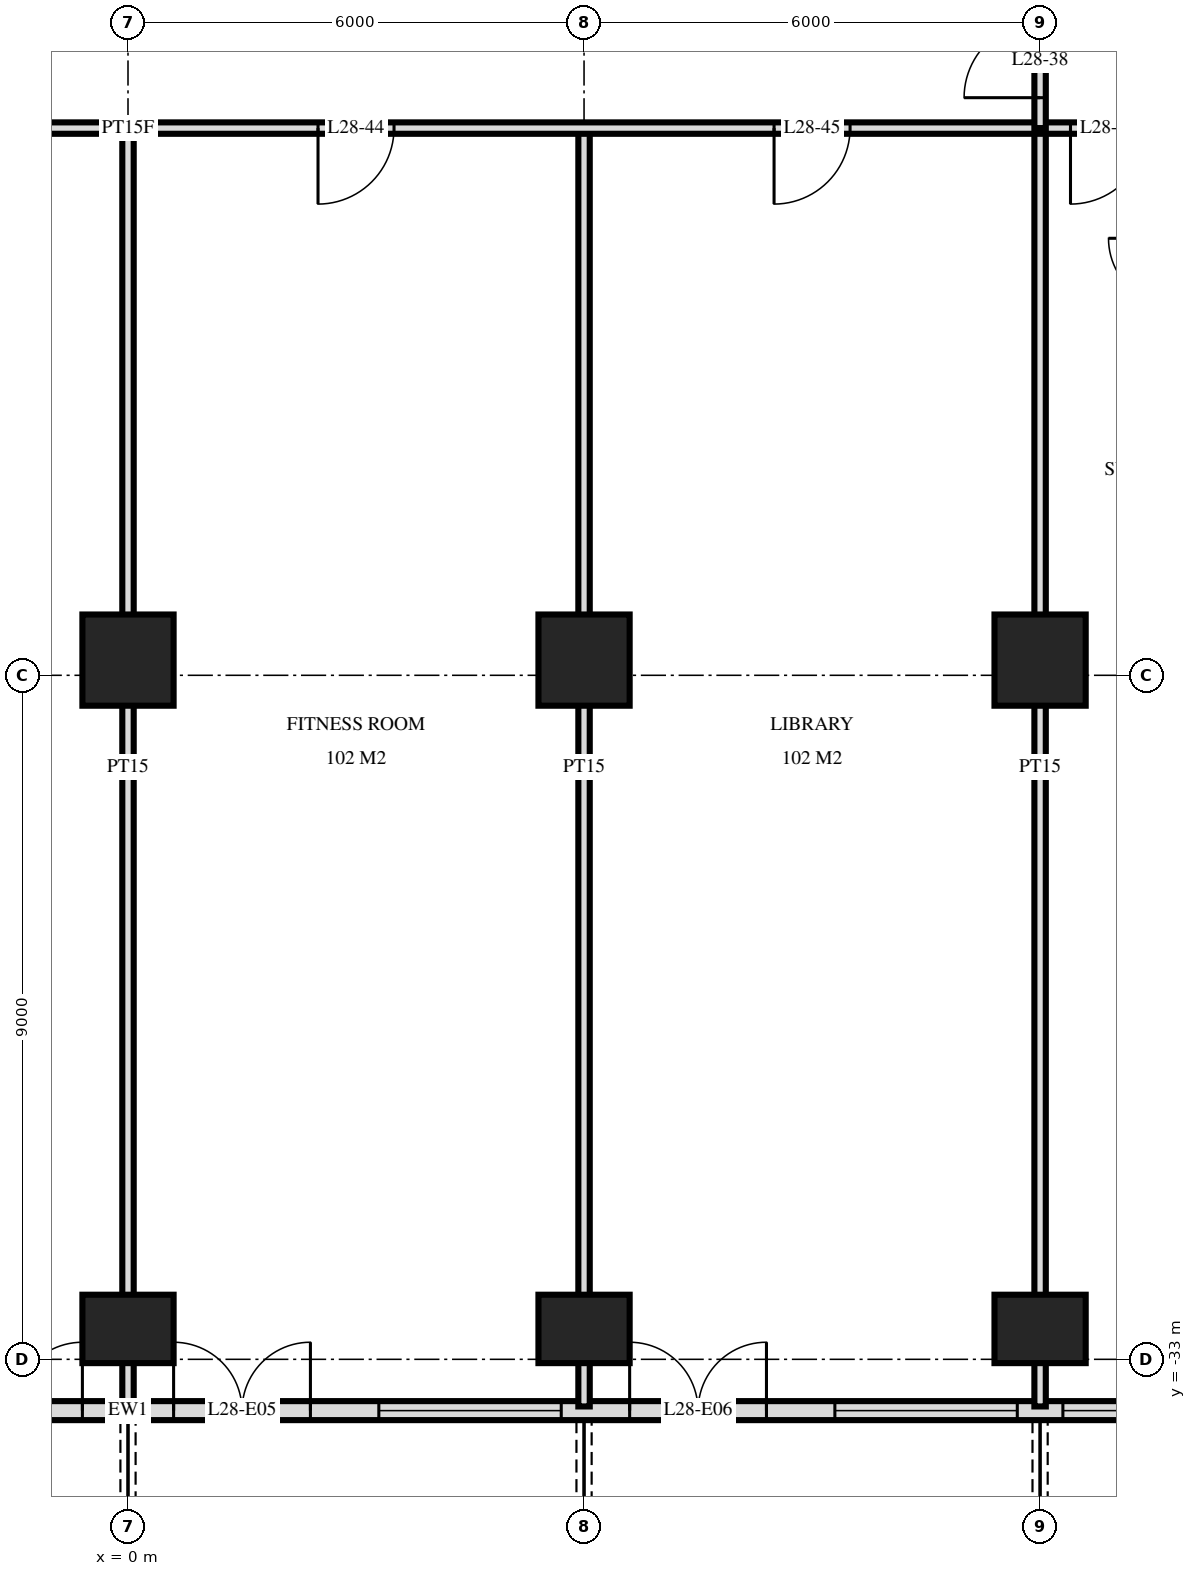
"""IFC4 building model, lengths in metres.
Left out: names, types, materials, properties, quantities, classifications, styles, units other than length and angle.
Written with IfcOpenShell. Run it as: python <this file> out.ifc"""

import sys

from ifc_helpers import new_model, si_unit, direction, frame, frame_2d, origin, origin_2d, place, context, subcontext, project, spatial, rectangle, extrude, element, fill, save


model = new_model("IFC4")
c1 = context("Model", 3, precision=1e-05, world=origin(), true_north=direction((0.0, 1.0)))
c2 = subcontext(c1, "Body", "Model", "MODEL_VIEW")
j1 = project(units=[si_unit("LENGTHUNIT", "METRE"), si_unit("PLANEANGLEUNIT", "RADIAN")], contexts=[c1])
p1 = place(None, origin())
s1 = spatial("IfcSite", under=j1, at=p1, CompositionType="ELEMENT")
p2 = place(p1, origin())
s2 = spatial("IfcBuilding", under=s1, at=p2, CompositionType="ELEMENT")
p3 = place(p2, frame((0.0, 0.0, 112.8)))
s3 = spatial("IfcBuildingStorey", under=s2, at=p3, CompositionType="ELEMENT", Elevation=112.8)
p4 = place(p3, frame((0.0, -32.6, -0.28), z_axis=(0.0, 0.0, 1.0), x_axis=(1.0, 0.0, 0.0)))
e1 = element("IfcColumn", 1, at=p4, inside=s3, PredefinedType="COLUMN", context=c2, shape_type="SweptSolid", body=[
    extrude(rectangle(XDim=1.2, YDim=0.9, at=origin_2d()), origin(), (0.0, 0.0, 1.0), 3.88),
])
p5 = place(p3, frame((0.0, -23.8, -0.28), z_axis=(0.0, 0.0, 1.0), x_axis=(1.0, 0.0, 0.0)))
e2 = element("IfcColumn", 2, at=p5, inside=s3, PredefinedType="COLUMN", context=c2, shape_type="SweptSolid", body=[
    extrude(rectangle(XDim=1.2, YDim=1.2, at=origin_2d()), origin(), (0.0, 0.0, 1.0), 3.88),
])
p6 = place(p3, frame((6.0, -32.6, -0.28), z_axis=(0.0, 0.0, 1.0), x_axis=(1.0, 0.0, 0.0)))
e3 = element("IfcColumn", 3, at=p6, inside=s3, PredefinedType="COLUMN", context=c2, shape_type="SweptSolid", body=[
    extrude(rectangle(XDim=1.2, YDim=0.9, at=origin_2d()), origin(), (0.0, 0.0, 1.0), 3.88),
])
p7 = place(p3, frame((6.0, -23.8, -0.28), z_axis=(0.0, 0.0, 1.0), x_axis=(1.0, 0.0, 0.0)))
e4 = element("IfcColumn", 4, at=p7, inside=s3, PredefinedType="COLUMN", context=c2, shape_type="SweptSolid", body=[
    extrude(rectangle(XDim=1.2, YDim=1.2, at=origin_2d()), origin(), (0.0, 0.0, 1.0), 3.88),
])
p8 = place(p3, frame((12.0, -32.6, -0.28), z_axis=(0.0, 0.0, 1.0), x_axis=(1.0, 0.0, 0.0)))
e5 = element("IfcColumn", 5, at=p8, inside=s3, PredefinedType="COLUMN", context=c2, shape_type="SweptSolid", body=[
    extrude(rectangle(XDim=1.2, YDim=0.9, at=origin_2d()), origin(), (0.0, 0.0, 1.0), 3.88),
])
p9 = place(p3, frame((12.0, -23.8, -0.28), z_axis=(0.0, 0.0, 1.0), x_axis=(1.0, 0.0, 0.0)))
e6 = element("IfcColumn", 6, at=p9, inside=s3, PredefinedType="COLUMN", context=c2, shape_type="SweptSolid", body=[
    extrude(rectangle(XDim=1.2, YDim=1.2, at=origin_2d()), origin(), (0.0, 0.0, 1.0), 3.88),
])
p10 = place(p3, frame((-23.675, -33.675, 0.0), z_axis=(0.0, 0.0, 1.0), x_axis=(1.0, 0.0, 0.0)))
e7 = element("IfcWall", 7, at=p10, inside=s3, PredefinedType="SOLIDWALL", context=c2, shape_type="SweptSolid", body=[
    extrude(rectangle(XDim=47.351, YDim=0.25, at=frame_2d((23.675, 0.0))), origin(), (0.0, 0.0, 1.0), 3.32),
])
p11 = place(p10, frame((0.275, 0.0, 0.3)))
e8 = element("IfcOpeningElement", 8, at=p11, cuts=e7, PredefinedType="OPENING", context=c2, shape_type="SweptSolid", body=[
    extrude(rectangle(XDim=2.4, YDim=2.1, at=frame_2d((1.2, 1.05))), frame((0.0, 0.135, 0.0), z_axis=(0.0, -1.0, 0.0), x_axis=(1.0, 0.0, 0.0)), (0.0, 0.0, 1.0), 0.27),
])
p12 = place(p10, frame((3.425, 0.0, 0.0)))
e9 = element("IfcOpeningElement", 9, at=p12, cuts=e7, PredefinedType="OPENING", context=c2, shape_type="SweptSolid", body=[
    extrude(rectangle(XDim=1.8, YDim=2.4, at=frame_2d((0.9, 1.2))), frame((0.0, 0.135, 0.0), z_axis=(0.0, -1.0, 0.0), x_axis=(1.0, 0.0, 0.0)), (0.0, 0.0, 1.0), 0.27),
])
p13 = place(p10, frame((5.975, 0.0, 0.3)))
e10 = element("IfcOpeningElement", 10, at=p13, cuts=e7, PredefinedType="OPENING", context=c2, shape_type="SweptSolid", body=[
    extrude(rectangle(XDim=2.4, YDim=2.1, at=frame_2d((1.2, 1.05))), frame((0.0, 0.135, 0.0), z_axis=(0.0, -1.0, 0.0), x_axis=(1.0, 0.0, 0.0)), (0.0, 0.0, 1.0), 0.27),
])
p14 = place(p10, frame((9.275, 0.0, 0.0)))
e11 = element("IfcOpeningElement", 11, at=p14, cuts=e7, PredefinedType="OPENING", context=c2, shape_type="SweptSolid", body=[
    extrude(rectangle(XDim=1.8, YDim=2.4, at=frame_2d((0.9, 1.2))), frame((0.0, 0.135, 0.0), z_axis=(0.0, -1.0, 0.0), x_axis=(1.0, 0.0, 0.0)), (0.0, 0.0, 1.0), 0.27),
])
p15 = place(p10, frame((12.275, 0.0, 0.0)))
e12 = element("IfcOpeningElement", 12, at=p15, cuts=e7, PredefinedType="OPENING", context=c2, shape_type="SweptSolid", body=[
    extrude(rectangle(XDim=1.8, YDim=2.4, at=frame_2d((0.9, 1.2))), frame((0.0, 0.135, 0.0), z_axis=(0.0, -1.0, 0.0), x_axis=(1.0, 0.0, 0.0)), (0.0, 0.0, 1.0), 0.27),
])
p16 = place(p10, frame((14.975, 0.0, 0.3)))
e13 = element("IfcOpeningElement", 13, at=p16, cuts=e7, PredefinedType="OPENING", context=c2, shape_type="SweptSolid", body=[
    extrude(rectangle(XDim=2.4, YDim=2.1, at=frame_2d((1.2, 1.05))), frame((0.0, 0.135, 0.0), z_axis=(0.0, -1.0, 0.0), x_axis=(1.0, 0.0, 0.0)), (0.0, 0.0, 1.0), 0.27),
])
p17 = place(p10, frame((17.975, 0.0, 0.3)))
e14 = element("IfcOpeningElement", 14, at=p17, cuts=e7, PredefinedType="OPENING", context=c2, shape_type="SweptSolid", body=[
    extrude(rectangle(XDim=2.4, YDim=2.1, at=frame_2d((1.2, 1.05))), frame((0.0, 0.135, 0.0), z_axis=(0.0, -1.0, 0.0), x_axis=(1.0, 0.0, 0.0)), (0.0, 0.0, 1.0), 0.27),
])
p18 = place(p10, frame((21.275, 0.0, 0.0)))
e15 = element("IfcOpeningElement", 15, at=p18, cuts=e7, PredefinedType="OPENING", context=c2, shape_type="SweptSolid", body=[
    extrude(rectangle(XDim=1.8, YDim=2.4, at=frame_2d((0.9, 1.2))), frame((0.0, 0.135, 0.0), z_axis=(0.0, -1.0, 0.0), x_axis=(1.0, 0.0, 0.0)), (0.0, 0.0, 1.0), 0.27),
])
p19 = place(p10, frame((24.275, 0.0, 0.0)))
e16 = element("IfcOpeningElement", 16, at=p19, cuts=e7, PredefinedType="OPENING", context=c2, shape_type="SweptSolid", body=[
    extrude(rectangle(XDim=1.8, YDim=2.4, at=frame_2d((0.9, 1.2))), frame((0.0, 0.135, 0.0), z_axis=(0.0, -1.0, 0.0), x_axis=(1.0, 0.0, 0.0)), (0.0, 0.0, 1.0), 0.27),
])
p20 = place(p10, frame((26.975, 0.0, 0.3)))
e17 = element("IfcOpeningElement", 17, at=p20, cuts=e7, PredefinedType="OPENING", context=c2, shape_type="SweptSolid", body=[
    extrude(rectangle(XDim=2.4, YDim=2.1, at=frame_2d((1.2, 1.05))), frame((0.0, 0.135, 0.0), z_axis=(0.0, -1.0, 0.0), x_axis=(1.0, 0.0, 0.0)), (0.0, 0.0, 1.0), 0.27),
])
p21 = place(p10, frame((30.275, 0.0, 0.0)))
e18 = element("IfcOpeningElement", 18, at=p21, cuts=e7, PredefinedType="OPENING", context=c2, shape_type="SweptSolid", body=[
    extrude(rectangle(XDim=1.8, YDim=2.4, at=frame_2d((0.9, 1.2))), frame((0.0, 0.135, 0.0), z_axis=(0.0, -1.0, 0.0), x_axis=(1.0, 0.0, 0.0)), (0.0, 0.0, 1.0), 0.27),
])
p22 = place(p10, frame((32.975, 0.0, 0.3)))
e19 = element("IfcOpeningElement", 19, at=p22, cuts=e7, PredefinedType="OPENING", context=c2, shape_type="SweptSolid", body=[
    extrude(rectangle(XDim=2.4, YDim=2.1, at=frame_2d((1.2, 1.05))), frame((0.0, 0.135, 0.0), z_axis=(0.0, -1.0, 0.0), x_axis=(1.0, 0.0, 0.0)), (0.0, 0.0, 1.0), 0.27),
])
p23 = place(p10, frame((35.975, 0.0, 0.3)))
e20 = element("IfcOpeningElement", 20, at=p23, cuts=e7, PredefinedType="OPENING", context=c2, shape_type="SweptSolid", body=[
    extrude(rectangle(XDim=2.4, YDim=2.1, at=frame_2d((1.2, 1.05))), frame((0.0, 0.135, 0.0), z_axis=(0.0, -1.0, 0.0), x_axis=(1.0, 0.0, 0.0)), (0.0, 0.0, 1.0), 0.27),
])
p24 = place(p10, frame((39.275, 0.0, 0.0)))
e21 = element("IfcOpeningElement", 21, at=p24, cuts=e7, PredefinedType="OPENING", context=c2, shape_type="SweptSolid", body=[
    extrude(rectangle(XDim=1.8, YDim=2.4, at=frame_2d((0.9, 1.2))), frame((0.0, 0.135, 0.0), z_axis=(0.0, -1.0, 0.0), x_axis=(1.0, 0.0, 0.0)), (0.0, 0.0, 1.0), 0.27),
])
p25 = place(p10, frame((41.975, 0.0, 0.3)))
e22 = element("IfcOpeningElement", 22, at=p25, cuts=e7, PredefinedType="OPENING", context=c2, shape_type="SweptSolid", body=[
    extrude(rectangle(XDim=2.4, YDim=2.1, at=frame_2d((1.2, 1.05))), frame((0.0, 0.135, 0.0), z_axis=(0.0, -1.0, 0.0), x_axis=(1.0, 0.0, 0.0)), (0.0, 0.0, 1.0), 0.27),
])
p26 = place(p10, frame((45.125, 0.0, 0.0)))
e23 = element("IfcOpeningElement", 23, at=p26, cuts=e7, PredefinedType="OPENING", context=c2, shape_type="SweptSolid", body=[
    extrude(rectangle(XDim=1.8, YDim=2.4, at=frame_2d((0.9, 1.2))), frame((0.0, 0.135, 0.0), z_axis=(0.0, -1.0, 0.0), x_axis=(1.0, 0.0, 0.0)), (0.0, 0.0, 1.0), 0.27),
])
p27 = place(p3, frame((12.0, -16.8, 0.0), z_axis=(0.0, 0.0, 1.0), x_axis=(0.0, 1.0, 0.0)))
e24 = element("IfcWall", 24, at=p27, inside=s3, PredefinedType="PARTITIONING", context=c2, shape_type="SweptSolid", body=[
    extrude(rectangle(XDim=1.75, YDim=0.15, at=frame_2d((0.875, 0.0))), origin(), (0.0, 0.0, 1.0), 3.32),
])
p28 = place(p27, frame((0.4, 0.0, 0.0)))
e25 = element("IfcOpeningElement", 25, at=p28, cuts=e24, PredefinedType="OPENING", context=c2, shape_type="SweptSolid", body=[
    extrude(rectangle(XDim=1.0, YDim=2.1, at=frame_2d((0.5, 1.05))), frame((0.0, 0.085, 0.0), z_axis=(0.0, -1.0, 0.0), x_axis=(1.0, 0.0, 0.0)), (0.0, 0.0, 1.0), 0.17),
])
for number, where, z_axis, x_axis in (
    (26, (12.0, -33.62, 0.0), (0.0, 0.0, 1.0), (0.0, 1.0, 0.0)),
    (27, (6.0, -33.62, 0.0), (0.0, 0.0, 1.0), (0.0, 1.0, 0.0)),
    (28, (0.0, -33.62, 0.0), (0.0, 0.0, 1.0), (0.0, 1.0, 0.0)),
):
    element("IfcWall", number, at=place(p3, frame(where, z_axis=z_axis, x_axis=x_axis)), inside=s3, PredefinedType="PARTITIONING", context=c2, shape_type="SweptSolid", body=[
        extrude(rectangle(XDim=16.82, YDim=0.15, at=frame_2d((8.41, 0.0))), origin(), (0.0, 0.0, 1.0), 3.32),
    ])
p29 = place(p3, frame((-28.02, -16.8, 0.0), z_axis=(0.0, 0.0, 1.0), x_axis=(1.0, 0.0, 0.0)))
e29 = element("IfcWall", 29, at=p29, inside=s3, PredefinedType="PARTITIONING", context=c2, shape_type="SweptSolid", body=[
    extrude(rectangle(XDim=56.04, YDim=0.15, at=frame_2d((28.02, 0.0))), origin(), (0.0, 0.0, 1.0), 3.32),
])
p30 = place(p29, frame((13.17, 0.0, 0.0)))
e30 = element("IfcOpeningElement", 30, at=p30, cuts=e29, PredefinedType="OPENING", context=c2, shape_type="SweptSolid", body=[
    extrude(rectangle(XDim=1.0, YDim=2.1, at=frame_2d((0.5, 1.05))), frame((0.0, 0.085, 0.0), z_axis=(0.0, -1.0, 0.0), x_axis=(1.0, 0.0, 0.0)), (0.0, 0.0, 1.0), 0.17),
])
p31 = place(p29, frame((11.87, 0.0, 0.0)))
e31 = element("IfcOpeningElement", 31, at=p31, cuts=e29, PredefinedType="OPENING", context=c2, shape_type="SweptSolid", body=[
    extrude(rectangle(XDim=1.0, YDim=2.1, at=frame_2d((0.5, 1.05))), frame((0.0, 0.085, 0.0), z_axis=(0.0, -1.0, 0.0), x_axis=(1.0, 0.0, 0.0)), (0.0, 0.0, 1.0), 0.17),
])
p32 = place(p29, frame((8.32, 0.0, 0.0)))
e32 = element("IfcOpeningElement", 32, at=p32, cuts=e29, PredefinedType="OPENING", context=c2, shape_type="SweptSolid", body=[
    extrude(rectangle(XDim=1.0, YDim=2.1, at=frame_2d((0.5, 1.05))), frame((0.0, 0.085, 0.0), z_axis=(0.0, -1.0, 0.0), x_axis=(1.0, 0.0, 0.0)), (0.0, 0.0, 1.0), 0.17),
])
p33 = place(p29, frame((40.42, 0.0, 0.0)))
e33 = element("IfcOpeningElement", 33, at=p33, cuts=e29, PredefinedType="OPENING", context=c2, shape_type="SweptSolid", body=[
    extrude(rectangle(XDim=1.0, YDim=2.1, at=frame_2d((0.5, 1.05))), frame((0.0, 0.085, 0.0), z_axis=(0.0, -1.0, 0.0), x_axis=(1.0, 0.0, 0.0)), (0.0, 0.0, 1.0), 0.17),
])
p34 = place(p29, frame((46.72, 0.0, 0.0)))
e34 = element("IfcOpeningElement", 34, at=p34, cuts=e29, PredefinedType="OPENING", context=c2, shape_type="SweptSolid", body=[
    extrude(rectangle(XDim=1.0, YDim=2.1, at=frame_2d((0.5, 1.05))), frame((0.0, 0.085, 0.0), z_axis=(0.0, -1.0, 0.0), x_axis=(1.0, 0.0, 0.0)), (0.0, 0.0, 1.0), 0.17),
])
p35 = place(p29, frame((21.52, 0.0, 0.0)))
e35 = element("IfcOpeningElement", 35, at=p35, cuts=e29, PredefinedType="OPENING", context=c2, shape_type="SweptSolid", body=[
    extrude(rectangle(XDim=1.0, YDim=2.1, at=frame_2d((0.5, 1.05))), frame((0.0, 0.085, 0.0), z_axis=(0.0, -1.0, 0.0), x_axis=(1.0, 0.0, 0.0)), (0.0, 0.0, 1.0), 0.17),
])
p36 = place(p29, frame((30.52, 0.0, 0.0)))
e36 = element("IfcOpeningElement", 36, at=p36, cuts=e29, PredefinedType="OPENING", context=c2, shape_type="SweptSolid", body=[
    extrude(rectangle(XDim=1.0, YDim=2.1, at=frame_2d((0.5, 1.05))), frame((0.0, 0.085, 0.0), z_axis=(0.0, -1.0, 0.0), x_axis=(1.0, 0.0, 0.0)), (0.0, 0.0, 1.0), 0.17),
])
p37 = place(p29, frame((36.52, 0.0, 0.0)))
e37 = element("IfcOpeningElement", 37, at=p37, cuts=e29, PredefinedType="OPENING", context=c2, shape_type="SweptSolid", body=[
    extrude(rectangle(XDim=1.0, YDim=2.1, at=frame_2d((0.5, 1.05))), frame((0.0, 0.085, 0.0), z_axis=(0.0, -1.0, 0.0), x_axis=(1.0, 0.0, 0.0)), (0.0, 0.0, 1.0), 0.17),
])
p38 = place(p18, origin())
e38 = element("IfcDoor", 38, at=p38, inside=s3, OperationType="DOUBLE_DOOR_SINGLE_SWING", PredefinedType="DOOR", context=c2, shape_type="SweptSolid", body=[
    extrude(rectangle(XDim=1.8, YDim=2.4, at=frame_2d((0.9, 1.2))), frame((0.0, 0.025, 0.0), z_axis=(0.0, -1.0, 0.0), x_axis=(1.0, 0.0, 0.0)), (0.0, 0.0, 1.0), 0.05),
])
fill(e15, e38)
p39 = place(p19, origin())
e39 = element("IfcDoor", 39, at=p39, inside=s3, OperationType="DOUBLE_DOOR_SINGLE_SWING", PredefinedType="DOOR", context=c2, shape_type="SweptSolid", body=[
    extrude(rectangle(XDim=1.8, YDim=2.4, at=frame_2d((0.9, 1.2))), frame((0.0, 0.025, 0.0), z_axis=(0.0, -1.0, 0.0), x_axis=(1.0, 0.0, 0.0)), (0.0, 0.0, 1.0), 0.05),
])
fill(e16, e39)
p40 = place(p20, origin())
e40 = element("IfcWindow", 40, at=p40, inside=s3, PartitioningType="SINGLE_PANEL", PredefinedType="WINDOW", context=c2, shape_type="SweptSolid", body=[
    extrude(rectangle(XDim=2.4, YDim=2.1, at=frame_2d((1.2, 1.05))), frame((0.0, 0.03, 0.0), z_axis=(0.0, -1.0, 0.0), x_axis=(1.0, 0.0, 0.0)), (0.0, 0.0, 1.0), 0.06),
])
fill(e17, e40)
p41 = place(p21, origin())
e41 = element("IfcDoor", 41, at=p41, inside=s3, OperationType="DOUBLE_DOOR_SINGLE_SWING", PredefinedType="DOOR", context=c2, shape_type="SweptSolid", body=[
    extrude(rectangle(XDim=1.8, YDim=2.4, at=frame_2d((0.9, 1.2))), frame((0.0, 0.025, 0.0), z_axis=(0.0, -1.0, 0.0), x_axis=(1.0, 0.0, 0.0)), (0.0, 0.0, 1.0), 0.05),
])
fill(e18, e41)
p42 = place(p22, origin())
e42 = element("IfcWindow", 42, at=p42, inside=s3, PartitioningType="SINGLE_PANEL", PredefinedType="WINDOW", context=c2, shape_type="SweptSolid", body=[
    extrude(rectangle(XDim=2.4, YDim=2.1, at=frame_2d((1.2, 1.05))), frame((0.0, 0.03, 0.0), z_axis=(0.0, -1.0, 0.0), x_axis=(1.0, 0.0, 0.0)), (0.0, 0.0, 1.0), 0.06),
])
fill(e19, e42)
p43 = place(p23, origin())
e43 = element("IfcWindow", 43, at=p43, inside=s3, PartitioningType="SINGLE_PANEL", PredefinedType="WINDOW", context=c2, shape_type="SweptSolid", body=[
    extrude(rectangle(XDim=2.4, YDim=2.1, at=frame_2d((1.2, 1.05))), frame((0.0, 0.03, 0.0), z_axis=(0.0, -1.0, 0.0), x_axis=(1.0, 0.0, 0.0)), (0.0, 0.0, 1.0), 0.06),
])
fill(e20, e43)
p44 = place(p28, origin())
e44 = element("IfcDoor", 44, at=p44, inside=s3, OperationType="SINGLE_SWING_RIGHT", PredefinedType="DOOR", context=c2, shape_type="SweptSolid", body=[
    extrude(rectangle(XDim=1.0, YDim=2.1, at=frame_2d((0.5, 1.05))), frame((0.0, 0.025, 0.0), z_axis=(0.0, -1.0, 0.0), x_axis=(1.0, 0.0, 0.0)), (0.0, 0.0, 1.0), 0.05),
])
fill(e25, e44)
p45 = place(p33, frame((0.5, 0.0, 0.0), z_axis=(0.0, 0.0, 1.0), x_axis=(-1.0, 0.0, 0.0)))
e45 = element("IfcDoor", 45, at=p45, inside=s3, OperationType="SINGLE_SWING_LEFT", PredefinedType="DOOR", context=c2, shape_type="SweptSolid", body=[
    extrude(rectangle(XDim=1.0, YDim=2.1, at=frame_2d((0.0, 1.05))), frame((0.0, -0.025, 0.0), z_axis=(0.0, 1.0, 0.0), x_axis=(-1.0, 0.0, 0.0)), (0.0, 0.0, 1.0), 0.05),
])
fill(e33, e45)
p46 = place(p36, frame((0.5, 0.0, 0.0), z_axis=(0.0, 0.0, 1.0), x_axis=(-1.0, 0.0, 0.0)))
e46 = element("IfcDoor", 46, at=p46, inside=s3, OperationType="SINGLE_SWING_LEFT", PredefinedType="DOOR", context=c2, shape_type="SweptSolid", body=[
    extrude(rectangle(XDim=1.0, YDim=2.1, at=frame_2d((0.0, 1.05))), frame((0.0, -0.025, 0.0), z_axis=(0.0, 1.0, 0.0), x_axis=(-1.0, 0.0, 0.0)), (0.0, 0.0, 1.0), 0.05),
])
fill(e36, e46)
p47 = place(p37, frame((0.5, 0.0, 0.0), z_axis=(0.0, 0.0, 1.0), x_axis=(-1.0, 0.0, 0.0)))
e47 = element("IfcDoor", 47, at=p47, inside=s3, OperationType="SINGLE_SWING_LEFT", PredefinedType="DOOR", context=c2, shape_type="SweptSolid", body=[
    extrude(rectangle(XDim=1.0, YDim=2.1, at=frame_2d((0.0, 1.05))), frame((0.0, -0.025, 0.0), z_axis=(0.0, 1.0, 0.0), x_axis=(-1.0, 0.0, 0.0)), (0.0, 0.0, 1.0), 0.05),
])
fill(e37, e47)
save(model, sys.argv[1])
